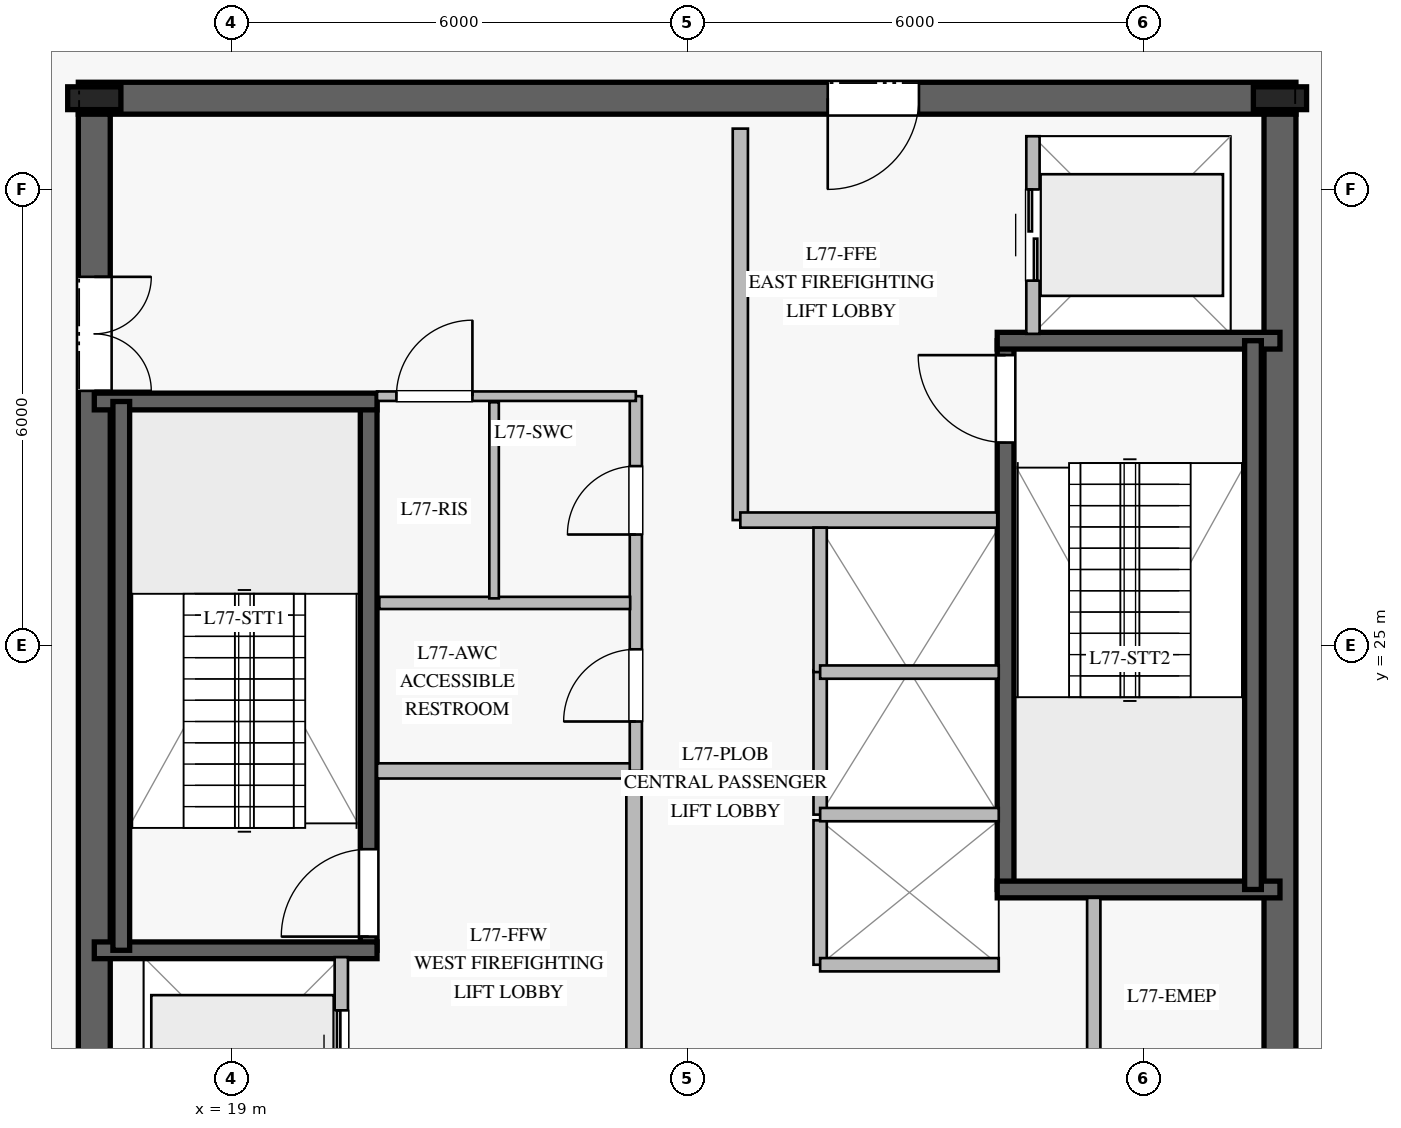
"""IFC4 building model, lengths in metres.
Left out: names, types, materials, properties, quantities, classifications, styles, units other than length and angle.
Written with IfcOpenShell. Run it as: python <this file> out.ifc"""

import sys

from ifc_helpers import new_model, si_unit, direction, frame, frame_2d, origin, origin_2d, place, context, subcontext, project, spatial, rectangle, i_section, extrude, element, fill, save


model = new_model("IFC4")
c1 = context("Model", 3, precision=1e-05, world=origin(), true_north=direction((0.0, 1.0)))
c2 = subcontext(c1, "Body", "Model", "MODEL_VIEW")
j1 = project(units=[si_unit("LENGTHUNIT", "METRE"), si_unit("PLANEANGLEUNIT", "RADIAN")], contexts=[c1])
p1 = place(None, origin())
s1 = spatial("IfcSite", under=j1, at=p1, CompositionType="ELEMENT")
p2 = place(p1, origin())
s2 = spatial("IfcBuilding", under=s1, at=p2, CompositionType="ELEMENT")
p3 = place(p2, frame((0.0, 0.0, 318.2)))
s3 = spatial("IfcBuildingStorey", under=s2, at=p3, CompositionType="ELEMENT", Elevation=318.2)
p4 = place(p3, frame((33.01, 32.2, 0.0), z_axis=(0.0, 0.0, 1.0), x_axis=(-1.0, 0.0, 0.0)))
e1 = element("IfcWall", 1, at=p4, inside=s3, PredefinedType="SHEAR", context=c2, shape_type="SweptSolid", body=[
    extrude(rectangle(XDim=16.02, YDim=0.42, at=frame_2d((8.01, 0.0))), origin(), (0.0, 0.0, 1.0), 4.14),
])
p5 = place(p4, frame((4.96, 0.0, 0.0)))
e2 = element("IfcOpeningElement", 2, at=p5, cuts=e1, PredefinedType="OPENING", context=c2, shape_type="SweptSolid", body=[
    extrude(rectangle(XDim=1.2, YDim=2.25, at=frame_2d((0.6, 1.125))), frame((0.0, 0.22, 0.0), z_axis=(0.0, -1.0, 0.0), x_axis=(1.0, 0.0, 0.0)), (0.0, 0.0, 1.0), 0.44),
])
p6 = place(p3, frame((17.2, 31.99, 0.0), z_axis=(0.0, 0.0, 1.0), x_axis=(0.0, -1.0, 0.0)))
e3 = element("IfcWall", 3, at=p6, inside=s3, PredefinedType="SHEAR", context=c2, shape_type="SweptSolid", body=[
    extrude(rectangle(XDim=13.98, YDim=0.42, at=frame_2d((6.99, 0.0))), origin(), (0.0, 0.0, 1.0), 4.14),
])
p7 = place(p6, frame((2.14, 0.0, 0.0)))
e4 = element("IfcOpeningElement", 4, at=p7, cuts=e3, PredefinedType="OPENING", context=c2, shape_type="SweptSolid", body=[
    extrude(rectangle(XDim=1.5, YDim=2.2, at=frame_2d((0.75, 1.1))), frame((0.0, 0.22, 0.0), z_axis=(0.0, -1.0, 0.0), x_axis=(1.0, 0.0, 0.0)), (0.0, 0.0, 1.0), 0.44),
])
p8 = place(p3, frame((32.8, 18.01, 0.0), z_axis=(0.0, 0.0, 1.0), x_axis=(0.0, 1.0, 0.0)))
e5 = element("IfcWall", 5, at=p8, inside=s3, PredefinedType="SHEAR", context=c2, shape_type="SweptSolid", body=[
    extrude(rectangle(XDim=13.98, YDim=0.42, at=frame_2d((6.99, 0.0))), origin(), (0.0, 0.0, 1.0), 4.14),
])
for number, where, z_axis, x_axis in (
    (6, (32.8, 32.2, 0.0), (0.0, 0.0, 1.0), (1.0, 0.0, 0.0)),
    (7, (17.2, 32.2, 0.0), (0.0, 0.0, 1.0), (1.0, 0.0, 0.0)),
):
    element("IfcColumn", number, at=place(p3, frame(where, z_axis=z_axis, x_axis=x_axis)), inside=s3, PredefinedType="COLUMN", context=c2, shape_type="SweptSolid", body=[
        extrude(i_section(OverallWidth=0.3, OverallDepth=0.7, WebThickness=0.017, FlangeThickness=0.032, at=origin_2d()), origin(), (0.0, 0.0, 1.0), 4.4),
    ])
p9 = place(p3, frame((20.81, 20.99, 0.0), z_axis=(0.0, 0.0, 1.0), x_axis=(0.0, 1.0, 0.0)))
e8 = element("IfcWall", 8, at=p9, inside=s3, PredefinedType="SOLIDWALL", context=c2, shape_type="SweptSolid", body=[
    extrude(rectangle(XDim=7.22, YDim=0.22, at=frame_2d((3.61, 0.0))), origin(), (0.0, 0.0, 1.0), 4.14),
])
p10 = place(p9, frame((0.18, 0.0, 0.0)))
e9 = element("IfcOpeningElement", 9, at=p10, cuts=e8, PredefinedType="OPENING", context=c2, shape_type="SweptSolid", body=[
    extrude(rectangle(XDim=1.15, YDim=2.2, at=frame_2d((0.575, 1.1))), frame((0.0, 0.12, 0.0), z_axis=(0.0, -1.0, 0.0), x_axis=(1.0, 0.0, 0.0)), (0.0, 0.0, 1.0), 0.24),
])
for number, where, z_axis, x_axis in (
    (10, (17.2, 20.99, 0.0), (0.0, 0.0, 1.0), (1.0, 0.0, 0.0)),
    (11, (17.2, 28.21, 0.0), (0.0, 0.0, 1.0), (1.0, 0.0, 0.0)),
):
    element("IfcWall", number, at=place(p3, frame(where, z_axis=z_axis, x_axis=x_axis)), inside=s3, PredefinedType="SOLIDWALL", context=c2, shape_type="SweptSolid", body=[
        extrude(rectangle(XDim=3.72, YDim=0.22, at=frame_2d((1.86, 0.0))), origin(), (0.0, 0.0, 1.0), 4.14),
    ])
p11 = place(p3, frame((17.555, 28.21, 0.0), z_axis=(0.0, 0.0, 1.0), x_axis=(0.0, -1.0, 0.0)))
e12 = element("IfcWall", 12, at=p11, inside=s3, PredefinedType="SOLIDWALL", context=c2, shape_type="SweptSolid", body=[
    extrude(rectangle(XDim=7.22, YDim=0.22, at=frame_2d((3.61, 0.0))), origin(), (0.0, 0.0, 1.0), 4.14),
])
p12 = place(p3, frame((29.19, 21.79, 0.0), z_axis=(0.0, 0.0, 1.0), x_axis=(0.0, 1.0, 0.0)))
e13 = element("IfcWall", 13, at=p12, inside=s3, PredefinedType="SOLIDWALL", context=c2, shape_type="SweptSolid", body=[
    extrude(rectangle(XDim=7.22, YDim=0.22, at=frame_2d((3.61, 0.0))), origin(), (0.0, 0.0, 1.0), 4.14),
])
p13 = place(p12, frame((5.88, 0.0, 0.0)))
e14 = element("IfcOpeningElement", 14, at=p13, cuts=e13, PredefinedType="OPENING", context=c2, shape_type="SweptSolid", body=[
    extrude(rectangle(XDim=1.15, YDim=2.2, at=frame_2d((0.575, 1.1))), frame((0.0, 0.12, 0.0), z_axis=(0.0, -1.0, 0.0), x_axis=(1.0, 0.0, 0.0)), (0.0, 0.0, 1.0), 0.24),
])
for number, where, z_axis, x_axis in (
    (15, (29.08, 21.79, 0.0), (0.0, 0.0, 1.0), (1.0, 0.0, 0.0)),
    (16, (29.08, 29.01, 0.0), (0.0, 0.0, 1.0), (1.0, 0.0, 0.0)),
):
    element("IfcWall", number, at=place(p3, frame(where, z_axis=z_axis, x_axis=x_axis)), inside=s3, PredefinedType="SOLIDWALL", context=c2, shape_type="SweptSolid", body=[
        extrude(rectangle(XDim=3.72, YDim=0.22, at=frame_2d((1.86, 0.0))), origin(), (0.0, 0.0, 1.0), 4.14),
    ])
p14 = place(p3, frame((32.445, 29.01, 0.0), z_axis=(0.0, 0.0, 1.0), x_axis=(0.0, -1.0, 0.0)))
e17 = element("IfcWall", 17, at=p14, inside=s3, PredefinedType="SOLIDWALL", context=c2, shape_type="SweptSolid", body=[
    extrude(rectangle(XDim=7.22, YDim=0.22, at=frame_2d((3.61, 0.0))), origin(), (0.0, 0.0, 1.0), 4.14),
])
p15 = place(p3, frame((41.671, 31.14, 0.0), z_axis=(0.0, 0.0, 1.0), x_axis=(-0.682027341853, 0.731326674588, 0.0)))
e18 = element("IfcWall", 18, at=p15, inside=s3, PredefinedType="STANDARD", context=c2, shape_type="SweptSolid", body=[
    extrude(rectangle(XDim=13.757, YDim=0.28, at=frame_2d((6.879, 0.0))), origin(), (0.0, 0.0, 1.0), 4.14),
])
p16 = place(p3, frame((24.3, 18.2, 0.0), z_axis=(0.0, 0.0, 1.0), x_axis=(0.0, 1.0, 0.0)))
e19 = element("IfcWall", 19, at=p16, inside=s3, PredefinedType="PARTITIONING", context=c2, shape_type="SweptSolid", body=[
    extrude(rectangle(XDim=5.15, YDim=0.2, at=frame_2d((2.575, 0.0))), origin(), (0.0, 0.0, 1.0), 4.14),
])
p17 = place(p3, frame((20.92, 23.35, 0.0), z_axis=(0.0, 0.0, 1.0), x_axis=(1.0, 0.0, 0.0)))
e20 = element("IfcWall", 20, at=p17, inside=s3, PredefinedType="PARTITIONING", context=c2, shape_type="SweptSolid", body=[
    extrude(rectangle(XDim=3.38, YDim=0.2, at=frame_2d((1.69, 0.0))), origin(), (0.0, 0.0, 1.0), 4.14),
])
p18 = place(p3, frame((25.7, 26.65, 0.0), z_axis=(0.0, 0.0, 1.0), x_axis=(0.0, 1.0, 0.0)))
e21 = element("IfcWall", 21, at=p18, inside=s3, PredefinedType="PARTITIONING", context=c2, shape_type="SweptSolid", body=[
    extrude(rectangle(XDim=5.15, YDim=0.2, at=frame_2d((2.575, 0.0))), origin(), (0.0, 0.0, 1.0), 4.14),
])
p19 = place(p3, frame((25.7, 26.65, 0.0), z_axis=(0.0, 0.0, 1.0), x_axis=(1.0, 0.0, 0.0)))
e22 = element("IfcWall", 22, at=p19, inside=s3, PredefinedType="PARTITIONING", context=c2, shape_type="SweptSolid", body=[
    extrude(rectangle(XDim=3.38, YDim=0.2, at=frame_2d((1.69, 0.0))), origin(), (0.0, 0.0, 1.0), 4.14),
])
p20 = place(p3, frame((24.325, 23.35, 0.0), z_axis=(0.0, 0.0, 1.0), x_axis=(0.0, 1.0, 0.0)))
e23 = element("IfcWall", 23, at=p20, inside=s3, PredefinedType="PLUMBINGWALL", context=c2, shape_type="SweptSolid", body=[
    extrude(rectangle(XDim=4.93, YDim=0.16, at=frame_2d((2.465, 0.0))), origin(), (0.0, 0.0, 1.0), 4.14),
])
p21 = place(p20, frame((0.65, 0.0, 0.0)))
e24 = element("IfcOpeningElement", 24, at=p21, cuts=e23, PredefinedType="OPENING", context=c2, shape_type="SweptSolid", body=[
    extrude(rectangle(XDim=0.95, YDim=2.1, at=frame_2d((0.475, 1.05))), frame((0.0, 0.09, 0.0), z_axis=(0.0, -1.0, 0.0), x_axis=(1.0, 0.0, 0.0)), (0.0, 0.0, 1.0), 0.18),
])
p22 = place(p20, frame((3.11, 0.0, 0.0)))
e25 = element("IfcOpeningElement", 25, at=p22, cuts=e23, PredefinedType="OPENING", context=c2, shape_type="SweptSolid", body=[
    extrude(rectangle(XDim=0.9, YDim=2.1, at=frame_2d((0.45, 1.05))), frame((0.0, 0.09, 0.0), z_axis=(0.0, -1.0, 0.0), x_axis=(1.0, 0.0, 0.0)), (0.0, 0.0, 1.0), 0.18),
])
p23 = place(p3, frame((20.92, 28.28, 0.0), z_axis=(0.0, 0.0, 1.0), x_axis=(1.0, 0.0, 0.0)))
e26 = element("IfcWall", 26, at=p23, inside=s3, PredefinedType="PARTITIONING", context=c2, shape_type="SweptSolid", body=[
    extrude(rectangle(XDim=3.405, YDim=0.125, at=frame_2d((1.703, 0.0))), origin(), (0.0, 0.0, 1.0), 4.14),
])
p24 = place(p23, frame((0.255, 0.0, 0.0)))
e27 = element("IfcOpeningElement", 27, at=p24, cuts=e26, PredefinedType="OPENING", context=c2, shape_type="SweptSolid", body=[
    extrude(rectangle(XDim=1.0, YDim=2.15, at=frame_2d((0.5, 1.075))), frame((0.0, 0.073, 0.0), z_axis=(0.0, -1.0, 0.0), x_axis=(1.0, 0.0, 0.0)), (0.0, 0.0, 1.0), 0.145),
])
p25 = place(p3, frame((20.95, 25.56, 0.0), z_axis=(0.0, 0.0, 1.0), x_axis=(1.0, 0.0, 0.0)))
e28 = element("IfcWall", 28, at=p25, inside=s3, PredefinedType="PLUMBINGWALL", context=c2, shape_type="SweptSolid", body=[
    extrude(rectangle(XDim=3.3, YDim=0.16, at=frame_2d((1.65, 0.0))), origin(), (0.0, 0.0, 1.0), 4.14),
])
p26 = place(p3, frame((22.46, 25.62, 0.0), z_axis=(0.0, 0.0, 1.0), x_axis=(0.0, 1.0, 0.0)))
e29 = element("IfcWall", 29, at=p26, inside=s3, PredefinedType="PARTITIONING", context=c2, shape_type="SweptSolid", body=[
    extrude(rectangle(XDim=2.58, YDim=0.125, at=frame_2d((1.29, 0.0))), origin(), (0.0, 0.0, 1.0), 4.14),
])
p27 = place(p3, frame((30.35, 18.2, 0.0), z_axis=(0.0, 0.0, 1.0), x_axis=(0.0, 1.0, 0.0)))
e30 = element("IfcWall", 30, at=p27, inside=s3, PredefinedType="PARTITIONING", context=c2, shape_type="SweptSolid", body=[
    extrude(rectangle(XDim=3.48, YDim=0.175, at=frame_2d((1.74, 0.0))), origin(), (0.0, 0.0, 1.0), 4.14),
])
p28 = place(p3, frame((26.75, 20.8, 0.0), z_axis=(0.0, 0.0, 1.0), x_axis=(0.0, 1.0, 0.0)))
e31 = element("IfcWall", 31, at=p28, inside=s3, PredefinedType="PARTITIONING", context=c2, shape_type="SweptSolid", body=[
    extrude(rectangle(XDim=1.9, YDim=0.175, at=frame_2d((0.95, 0.0))), origin(), (0.0, 0.0, 1.0), 4.14),
])
p29 = place(p3, frame((26.75, 20.8, 0.0), z_axis=(0.0, 0.0, 1.0), x_axis=(1.0, 0.0, 0.0)))
e32 = element("IfcWall", 32, at=p29, inside=s3, PredefinedType="PARTITIONING", context=c2, shape_type="SweptSolid", body=[
    extrude(rectangle(XDim=2.35, YDim=0.175, at=frame_2d((1.175, 0.0))), origin(), (0.0, 0.0, 1.0), 4.14),
])
p30 = place(p3, frame((26.75, 22.775, 0.0), z_axis=(0.0, 0.0, 1.0), x_axis=(0.0, 1.0, 0.0)))
e33 = element("IfcWall", 33, at=p30, inside=s3, PredefinedType="PARTITIONING", context=c2, shape_type="SweptSolid", body=[
    extrude(rectangle(XDim=1.9, YDim=0.175, at=frame_2d((0.95, 0.0))), origin(), (0.0, 0.0, 1.0), 4.14),
])
p31 = place(p3, frame((26.75, 22.775, 0.0), z_axis=(0.0, 0.0, 1.0), x_axis=(1.0, 0.0, 0.0)))
e34 = element("IfcWall", 34, at=p31, inside=s3, PredefinedType="PARTITIONING", context=c2, shape_type="SweptSolid", body=[
    extrude(rectangle(XDim=2.35, YDim=0.175, at=frame_2d((1.175, 0.0))), origin(), (0.0, 0.0, 1.0), 4.14),
])
p32 = place(p3, frame((26.75, 24.65, 0.0), z_axis=(0.0, 0.0, 1.0), x_axis=(0.0, 1.0, 0.0)))
e35 = element("IfcWall", 35, at=p32, inside=s3, PredefinedType="PARTITIONING", context=c2, shape_type="SweptSolid", body=[
    extrude(rectangle(XDim=1.9, YDim=0.175, at=frame_2d((0.95, 0.0))), origin(), (0.0, 0.0, 1.0), 4.14),
])
p33 = place(p3, frame((26.75, 24.65, 0.0), z_axis=(0.0, 0.0, 1.0), x_axis=(1.0, 0.0, 0.0)))
e36 = element("IfcWall", 36, at=p33, inside=s3, PredefinedType="PARTITIONING", context=c2, shape_type="SweptSolid", body=[
    extrude(rectangle(XDim=2.35, YDim=0.175, at=frame_2d((1.175, 0.0))), origin(), (0.0, 0.0, 1.0), 4.14),
])
p34 = place(p3, frame((20.45, 18.3, 0.0), z_axis=(0.0, 0.0, 1.0), x_axis=(0.0, 1.0, 0.0)))
e37 = element("IfcWall", 37, at=p34, inside=s3, PredefinedType="PARTITIONING", context=c2, shape_type="SweptSolid", body=[
    extrude(rectangle(XDim=2.6, YDim=0.175, at=frame_2d((1.3, 0.0))), origin(), (0.0, 0.0, 1.0), 4.14),
])
p35 = place(p34, frame((0.7, 0.0, 0.0)))
e38 = element("IfcOpeningElement", 38, at=p35, cuts=e37, PredefinedType="OPENING", context=c2, shape_type="SweptSolid", body=[
    extrude(rectangle(XDim=1.2, YDim=2.2, at=frame_2d((0.6, 1.1))), frame((0.0, 0.098, 0.0), z_axis=(0.0, -1.0, 0.0), x_axis=(1.0, 0.0, 0.0)), (0.0, 0.0, 1.0), 0.195),
])
p36 = place(p3, frame((29.55, 29.1, 0.0), z_axis=(0.0, 0.0, 1.0), x_axis=(0.0, 1.0, 0.0)))
e39 = element("IfcWall", 39, at=p36, inside=s3, PredefinedType="PARTITIONING", context=c2, shape_type="SweptSolid", body=[
    extrude(rectangle(XDim=2.6, YDim=0.175, at=frame_2d((1.3, 0.0))), origin(), (0.0, 0.0, 1.0), 4.14),
])
p37 = place(p36, frame((0.7, 0.0, 0.0)))
e40 = element("IfcOpeningElement", 40, at=p37, cuts=e39, PredefinedType="OPENING", context=c2, shape_type="SweptSolid", body=[
    extrude(rectangle(XDim=1.2, YDim=2.2, at=frame_2d((0.6, 1.1))), frame((0.0, 0.098, 0.0), z_axis=(0.0, -1.0, 0.0), x_axis=(1.0, 0.0, 0.0)), (0.0, 0.0, 1.0), 0.195),
])
p38 = place(p10, origin())
e41 = element("IfcDoor", 41, at=p38, inside=s3, OperationType="SINGLE_SWING_LEFT", PredefinedType="DOOR", context=c2, shape_type="SweptSolid", body=[
    extrude(rectangle(XDim=1.15, YDim=2.2, at=frame_2d((0.575, 1.1))), frame((0.0, 0.025, 0.0), z_axis=(0.0, -1.0, 0.0), x_axis=(1.0, 0.0, 0.0)), (0.0, 0.0, 1.0), 0.05),
])
fill(e9, e41)
p39 = place(p13, origin())
e42 = element("IfcDoor", 42, at=p39, inside=s3, OperationType="SINGLE_SWING_RIGHT", PredefinedType="DOOR", context=c2, shape_type="SweptSolid", body=[
    extrude(rectangle(XDim=1.15, YDim=2.2, at=frame_2d((0.575, 1.1))), frame((0.0, 0.025, 0.0), z_axis=(0.0, -1.0, 0.0), x_axis=(1.0, 0.0, 0.0)), (0.0, 0.0, 1.0), 0.05),
])
fill(e14, e42)
p40 = place(p5, origin())
e43 = element("IfcDoor", 43, at=p40, inside=s3, OperationType="SINGLE_SWING_RIGHT", PredefinedType="DOOR", context=c2, shape_type="SweptSolid", body=[
    extrude(rectangle(XDim=1.2, YDim=2.25, at=frame_2d((0.6, 1.125))), frame((0.0, 0.025, 0.0), z_axis=(0.0, -1.0, 0.0), x_axis=(1.0, 0.0, 0.0)), (0.0, 0.0, 1.0), 0.05),
])
fill(e2, e43)
p41 = place(p7, origin())
e44 = element("IfcDoor", 44, at=p41, inside=s3, OperationType="DOUBLE_DOOR_SINGLE_SWING", PredefinedType="DOOR", context=c2, shape_type="SweptSolid", body=[
    extrude(rectangle(XDim=1.5, YDim=2.2, at=frame_2d((0.75, 1.1))), frame((0.0, 0.025, 0.0), z_axis=(0.0, -1.0, 0.0), x_axis=(1.0, 0.0, 0.0)), (0.0, 0.0, 1.0), 0.05),
])
fill(e4, e44)
p42 = place(p21, origin())
e45 = element("IfcDoor", 45, at=p42, inside=s3, OperationType="SINGLE_SWING_LEFT", PredefinedType="DOOR", context=c2, shape_type="SweptSolid", body=[
    extrude(rectangle(XDim=0.95, YDim=2.1, at=frame_2d((0.475, 1.05))), frame((0.0, 0.025, 0.0), z_axis=(0.0, -1.0, 0.0), x_axis=(1.0, 0.0, 0.0)), (0.0, 0.0, 1.0), 0.05),
])
fill(e24, e45)
p43 = place(p24, origin())
e46 = element("IfcDoor", 46, at=p43, inside=s3, OperationType="SINGLE_SWING_RIGHT", PredefinedType="DOOR", context=c2, shape_type="SweptSolid", body=[
    extrude(rectangle(XDim=1.0, YDim=2.15, at=frame_2d((0.5, 1.075))), frame((0.0, 0.025, 0.0), z_axis=(0.0, -1.0, 0.0), x_axis=(1.0, 0.0, 0.0)), (0.0, 0.0, 1.0), 0.05),
])
fill(e27, e46)
p44 = place(p22, origin())
e47 = element("IfcDoor", 47, at=p44, inside=s3, OperationType="SINGLE_SWING_LEFT", PredefinedType="DOOR", context=c2, shape_type="SweptSolid", body=[
    extrude(rectangle(XDim=0.9, YDim=2.1, at=frame_2d((0.45, 1.05))), frame((0.0, 0.025, 0.0), z_axis=(0.0, -1.0, 0.0), x_axis=(1.0, 0.0, 0.0)), (0.0, 0.0, 1.0), 0.05),
])
fill(e25, e47)
p45 = place(p35, origin())
e48 = element("IfcDoor", 48, at=p45, inside=s3, OperationType="DOUBLE_DOOR_SLIDING", PredefinedType="DOOR", context=c2, shape_type="SweptSolid", body=[
    extrude(rectangle(XDim=1.2, YDim=2.2, at=frame_2d((0.6, 1.1))), frame((0.0, 0.025, 0.0), z_axis=(0.0, -1.0, 0.0), x_axis=(1.0, 0.0, 0.0)), (0.0, 0.0, 1.0), 0.05),
])
fill(e38, e48)
p46 = place(p37, origin())
e49 = element("IfcDoor", 49, at=p46, inside=s3, OperationType="DOUBLE_DOOR_SLIDING", PredefinedType="DOOR", context=c2, shape_type="SweptSolid", body=[
    extrude(rectangle(XDim=1.2, YDim=2.2, at=frame_2d((0.6, 1.1))), frame((0.0, 0.025, 0.0), z_axis=(0.0, -1.0, 0.0), x_axis=(1.0, 0.0, 0.0)), (0.0, 0.0, 1.0), 0.05),
])
fill(e40, e49)
save(model, sys.argv[1])
